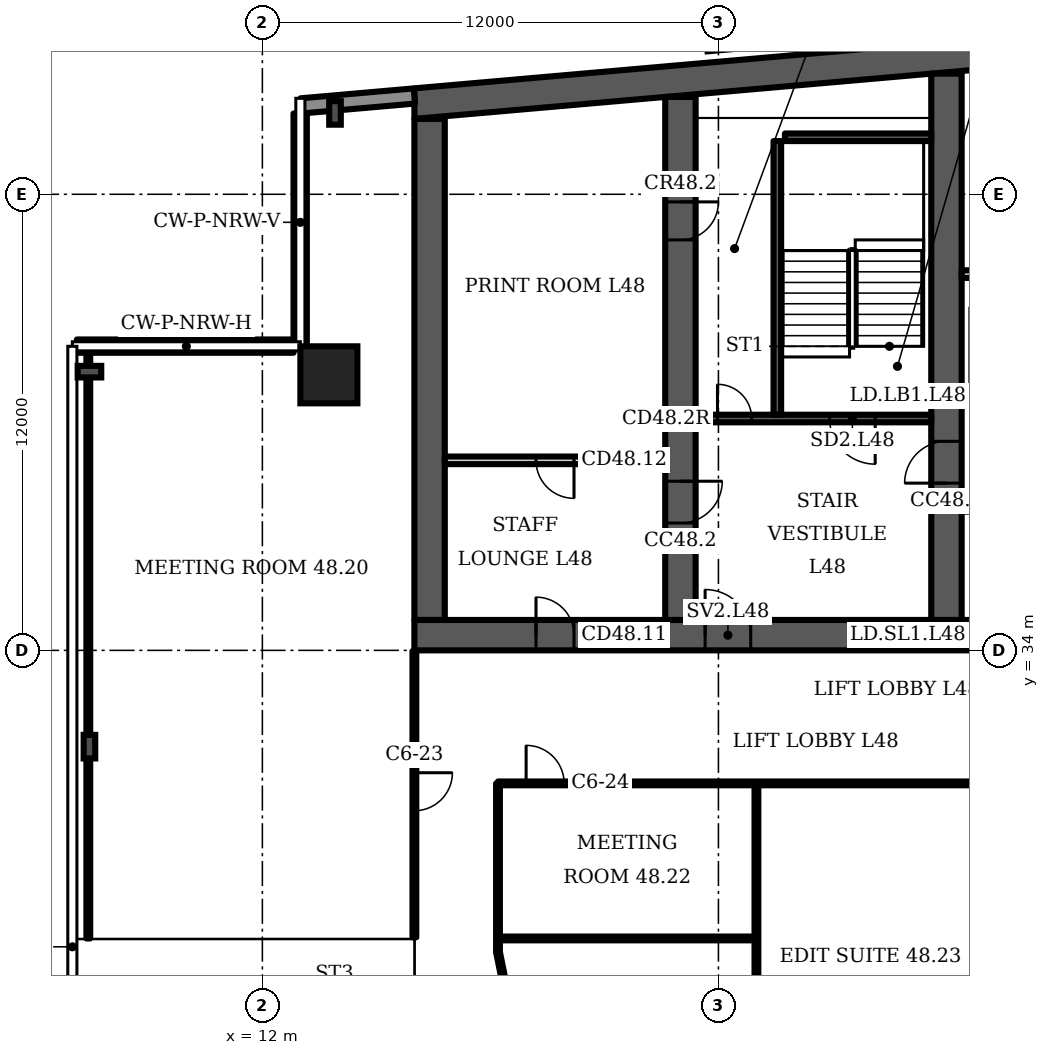
"""IFC4 building model, lengths in metres.
Left out: names, types, materials, properties, quantities, classifications, styles, units other than length and angle.
Written with IfcOpenShell. Run it as: python <this file> out.ifc"""

import sys

from ifc_helpers import new_model, si_unit, direction, frame, frame_2d, origin, origin_2d, place, context, subcontext, project, spatial, polyline, rectangle, i_section, outline, extrude, element, fill, save


model = new_model("IFC4")
c1 = context("Model", 3, precision=1e-05, world=origin(), true_north=direction((0.0, 1.0)))
c2 = subcontext(c1, "Body", "Model", "MODEL_VIEW")
j1 = project(units=[si_unit("LENGTHUNIT", "METRE"), si_unit("PLANEANGLEUNIT", "RADIAN")], contexts=[c1])
p1 = place(None, origin())
s1 = spatial("IfcSite", under=j1, at=p1, CompositionType="ELEMENT")
p2 = place(p1, origin())
s2 = spatial("IfcBuilding", under=s1, at=p2, CompositionType="ELEMENT")
p3 = place(p2, frame((0.0, 0.0, 195.1)))
s3 = spatial("IfcBuildingStorey", under=s2, at=p3, CompositionType="ELEMENT", Elevation=195.1)
p4 = place(p3, frame((0.0, 0.0, -0.0)))
e1 = element("IfcWall", 1, at=p4, inside=s3, PredefinedType="SHEAR", context=c2, shape_type="SweptSolid", body=[
    extrude(outline(polyline([(16.0, 47.984), (37.0, 49.822), (58.0, 47.984), (58.0, 48.787), (37.0, 50.625), (16.0, 48.787), (16.0, 47.984)])), origin(), (0.0, 0.0, 1.0), 3.6),
])
p5 = place(p3, frame((16.0, 34.4, 0.0), z_axis=(0.0, 0.0, 1.0), x_axis=(1.0, 0.0, 0.0)))
e2 = element("IfcWall", 2, at=p5, inside=s3, PredefinedType="SHEAR", context=c2, shape_type="SweptSolid", body=[
    extrude(rectangle(XDim=42.0, YDim=0.8, at=frame_2d((21.0, 0.0))), origin(), (0.0, 0.0, 1.0), 3.6),
])
p6 = place(p5, frame((3.2, 0.0, 0.0)))
e3 = element("IfcOpeningElement", 3, at=p6, cuts=e2, PredefinedType="OPENING", context=c2, shape_type="SweptSolid", body=[
    extrude(rectangle(XDim=1.0, YDim=2.1, at=frame_2d((0.5, 1.05))), frame((0.0, 0.41, 0.0), z_axis=(0.0, -1.0, 0.0), x_axis=(1.0, 0.0, 0.0)), (0.0, 0.0, 1.0), 0.82),
])
p7 = place(p5, frame((7.65, 0.0, 0.0)))
e4 = element("IfcOpeningElement", 4, at=p7, cuts=e2, PredefinedType="OPENING", context=c2, shape_type="SweptSolid", body=[
    extrude(rectangle(XDim=1.2, YDim=2.1, at=frame_2d((0.6, 1.05))), frame((0.0, 0.41, 0.0), z_axis=(0.0, -1.0, 0.0), x_axis=(1.0, 0.0, 0.0)), (0.0, 0.0, 1.0), 0.82),
])
p8 = place(p5, frame((14.767, 0.0, 0.0)))
e5 = element("IfcOpeningElement", 5, at=p8, cuts=e2, PredefinedType="OPENING", context=c2, shape_type="SweptSolid", body=[
    extrude(rectangle(XDim=1.1, YDim=2.1, at=frame_2d((0.55, 1.05))), frame((0.0, 0.41, 0.0), z_axis=(0.0, -1.0, 0.0), x_axis=(1.0, 0.0, 0.0)), (0.0, 0.0, 1.0), 0.82),
])
p9 = place(p5, frame((19.133, 0.0, 0.0)))
e6 = element("IfcOpeningElement", 6, at=p9, cuts=e2, PredefinedType="OPENING", context=c2, shape_type="SweptSolid", body=[
    extrude(rectangle(XDim=1.1, YDim=2.1, at=frame_2d((0.55, 1.05))), frame((0.0, 0.41, 0.0), z_axis=(0.0, -1.0, 0.0), x_axis=(1.0, 0.0, 0.0)), (0.0, 0.0, 1.0), 0.82),
])
p10 = place(p5, frame((16.8, 0.0, 0.0)))
e7 = element("IfcOpeningElement", 7, at=p10, cuts=e2, PredefinedType="OPENING", context=c2, shape_type="SweptSolid", body=[
    extrude(rectangle(XDim=1.4, YDim=2.1, at=frame_2d((0.7, 1.05))), frame((0.0, 0.41, 0.0), z_axis=(0.0, -1.0, 0.0), x_axis=(1.0, 0.0, 0.0)), (0.0, 0.0, 1.0), 0.82),
])
p11 = place(p5, frame((21.767, 0.0, 0.0)))
e8 = element("IfcOpeningElement", 8, at=p11, cuts=e2, PredefinedType="OPENING", context=c2, shape_type="SweptSolid", body=[
    extrude(rectangle(XDim=1.1, YDim=2.1, at=frame_2d((0.55, 1.05))), frame((0.0, 0.41, 0.0), z_axis=(0.0, -1.0, 0.0), x_axis=(1.0, 0.0, 0.0)), (0.0, 0.0, 1.0), 0.82),
])
p12 = place(p5, frame((23.95, 0.0, 0.0)))
e9 = element("IfcOpeningElement", 9, at=p12, cuts=e2, PredefinedType="OPENING", context=c2, shape_type="SweptSolid", body=[
    extrude(rectangle(XDim=1.1, YDim=2.1, at=frame_2d((0.55, 1.05))), frame((0.0, 0.41, 0.0), z_axis=(0.0, -1.0, 0.0), x_axis=(1.0, 0.0, 0.0)), (0.0, 0.0, 1.0), 0.82),
])
p13 = place(p5, frame((26.133, 0.0, 0.0)))
e10 = element("IfcOpeningElement", 10, at=p13, cuts=e2, PredefinedType="OPENING", context=c2, shape_type="SweptSolid", body=[
    extrude(rectangle(XDim=1.1, YDim=2.1, at=frame_2d((0.55, 1.05))), frame((0.0, 0.41, 0.0), z_axis=(0.0, -1.0, 0.0), x_axis=(1.0, 0.0, 0.0)), (0.0, 0.0, 1.0), 0.82),
])
p14 = place(p5, frame((33.15, 0.0, 0.0)))
e11 = element("IfcOpeningElement", 11, at=p14, cuts=e2, PredefinedType="OPENING", context=c2, shape_type="SweptSolid", body=[
    extrude(rectangle(XDim=1.2, YDim=2.1, at=frame_2d((0.6, 1.05))), frame((0.0, 0.41, 0.0), z_axis=(0.0, -1.0, 0.0), x_axis=(1.0, 0.0, 0.0)), (0.0, 0.0, 1.0), 0.82),
])
p15 = place(p5, frame((35.817, 0.0, 0.0)))
e12 = element("IfcOpeningElement", 12, at=p15, cuts=e2, PredefinedType="OPENING", context=c2, shape_type="SweptSolid", body=[
    extrude(rectangle(XDim=1.0, YDim=2.1, at=frame_2d((0.5, 1.05))), frame((0.0, 0.41, 0.0), z_axis=(0.0, -1.0, 0.0), x_axis=(1.0, 0.0, 0.0)), (0.0, 0.0, 1.0), 0.82),
])
p16 = place(p5, frame((39.95, 0.0, 0.0)))
e13 = element("IfcOpeningElement", 13, at=p16, cuts=e2, PredefinedType="OPENING", context=c2, shape_type="SweptSolid", body=[
    extrude(rectangle(XDim=1.0, YDim=2.1, at=frame_2d((0.5, 1.05))), frame((0.0, 0.41, 0.0), z_axis=(0.0, -1.0, 0.0), x_axis=(1.0, 0.0, 0.0)), (0.0, 0.0, 1.0), 0.82),
])
p17 = place(p5, frame((37.767, 0.0, 0.0)))
e14 = element("IfcOpeningElement", 14, at=p17, cuts=e2, PredefinedType="OPENING", context=c2, shape_type="SweptSolid", body=[
    extrude(rectangle(XDim=1.4, YDim=2.1, at=frame_2d((0.7, 1.05))), frame((0.0, 0.41, 0.0), z_axis=(0.0, -1.0, 0.0), x_axis=(1.0, 0.0, 0.0)), (0.0, 0.0, 1.0), 0.82),
])
p18 = place(p3, frame((16.4, 34.8, 0.0), z_axis=(0.0, 0.0, 1.0), x_axis=(0.0, 1.0, 0.0)))
e15 = element("IfcWall", 15, at=p18, inside=s3, PredefinedType="SHEAR", context=c2, shape_type="SweptSolid", body=[
    extrude(rectangle(XDim=13.184, YDim=0.8, at=frame_2d((6.592, 0.0))), origin(), (0.0, 0.0, 1.0), 3.6),
])
p19 = place(p3, frame((23.0, 34.8, 0.0), z_axis=(0.0, 0.0, 1.0), x_axis=(0.0, 1.0, 0.0)))
e16 = element("IfcWall", 16, at=p19, inside=s3, PredefinedType="SHEAR", context=c2, shape_type="SweptSolid", body=[
    extrude(rectangle(XDim=13.762, YDim=0.8, at=frame_2d((6.881, 0.0))), origin(), (0.0, 0.0, 1.0), 3.6),
])
p20 = place(p19, frame((2.55, 0.0, 0.0)))
e17 = element("IfcOpeningElement", 17, at=p20, cuts=e16, PredefinedType="OPENING", context=c2, shape_type="SweptSolid", body=[
    extrude(rectangle(XDim=1.1, YDim=2.1, at=frame_2d((0.55, 1.05))), frame((0.0, 0.41, 0.0), z_axis=(0.0, -1.0, 0.0), x_axis=(1.0, 0.0, 0.0)), (0.0, 0.0, 1.0), 0.82),
])
p21 = place(p19, frame((10.0, 0.0, 0.0)))
e18 = element("IfcOpeningElement", 18, at=p21, cuts=e16, PredefinedType="OPENING", context=c2, shape_type="SweptSolid", body=[
    extrude(rectangle(XDim=1.0, YDim=2.1, at=frame_2d((0.5, 1.05))), frame((0.0, 0.41, 0.0), z_axis=(0.0, -1.0, 0.0), x_axis=(1.0, 0.0, 0.0)), (0.0, 0.0, 1.0), 0.82),
])
p22 = place(p3, frame((30.0, 34.8, 0.0), z_axis=(0.0, 0.0, 1.0), x_axis=(0.0, 1.0, 0.0)))
e19 = element("IfcWall", 19, at=p22, inside=s3, PredefinedType="SHEAR", context=c2, shape_type="SweptSolid", body=[
    extrude(rectangle(XDim=14.374, YDim=0.8, at=frame_2d((7.187, 0.0))), origin(), (0.0, 0.0, 1.0), 3.6),
])
p23 = place(p22, frame((3.6, 0.0, 0.0)))
e20 = element("IfcOpeningElement", 20, at=p23, cuts=e19, PredefinedType="OPENING", context=c2, shape_type="SweptSolid", body=[
    extrude(rectangle(XDim=1.1, YDim=2.1, at=frame_2d((0.55, 1.05))), frame((0.0, 0.41, 0.0), z_axis=(0.0, -1.0, 0.0), x_axis=(1.0, 0.0, 0.0)), (0.0, 0.0, 1.0), 0.82),
])
p24 = place(p3, frame((13.75, 41.25, 0.0), z_axis=(0.0, 0.0, 1.0), x_axis=(1.0, 0.0, 0.0)))
e21 = element("IfcColumn", 21, at=p24, inside=s3, PredefinedType="COLUMN", context=c2, shape_type="SweptSolid", body=[
    extrude(rectangle(XDim=1.5, YDim=1.5, at=origin_2d()), origin(), (0.0, 0.0, 1.0), 3.6),
])
for number, where, z_axis, x_axis in (
    (22, (13.911, 48.141, 0.0), (0.0, 0.0, 1.0), (-1.0, 0.0, 0.0)),
    (23, (7.45, 41.333, 0.0), (0.0, 0.0, 1.0), (0.0, 1.0, 0.0)),
    (24, (7.45, 31.467, 0.0), (0.0, 0.0, 1.0), (-1.0, 0.0, 0.0)),
):
    element("IfcColumn", number, at=place(p3, frame(where, z_axis=z_axis, x_axis=x_axis)), inside=s3, PredefinedType="COLUMN", context=c2, shape_type="SweptSolid", body=[
        extrude(i_section(OverallWidth=0.305, OverallDepth=0.62, WebThickness=0.021, FlangeThickness=0.04, FilletRadius=0.027, at=origin_2d()), origin(), (0.0, 0.0, 1.0), 3.6),
    ])
p25 = place(p3, frame((16.0, 48.587, 0.0), z_axis=(0.0, 0.0, 1.0), x_axis=(-0.996194, -0.087168, 0.0)))
e25 = element("IfcWall", 25, at=p25, inside=s3, PredefinedType="SOLIDWALL", context=c2, shape_type="SweptSolid", body=[
    extrude(rectangle(XDim=2.994, YDim=0.4, at=frame_2d((1.497, 0.0))), origin(), (0.0, 0.0, 1.0), 3.2),
])
p26 = place(p3, frame((12.995, 48.126, 0.0), z_axis=(0.0, 0.0, 1.0), x_axis=(0.0, -1.0, 0.0)))
e26 = element("IfcWall", 26, at=p26, inside=s3, PredefinedType="SOLIDWALL", context=c2, shape_type="SweptSolid", body=[
    extrude(rectangle(XDim=6.126, YDim=0.35, at=frame_2d((3.063, 0.0))), origin(), (0.0, 0.0, 1.0), 1.0),
])
p27 = place(p3, frame((12.82, 42.005, 0.0), z_axis=(0.0, 0.0, 1.0), x_axis=(-1.0, 0.0, 0.0)))
e27 = element("IfcWall", 27, at=p27, inside=s3, PredefinedType="SOLIDWALL", context=c2, shape_type="SweptSolid", body=[
    extrude(rectangle(XDim=5.7, YDim=0.35, at=frame_2d((2.85, 0.0))), origin(), (0.0, 0.0, 1.0), 1.0),
])
p28 = place(p3, frame((16.8, 39.0, 0.0), z_axis=(0.0, 0.0, 1.0), x_axis=(1.0, 0.0, 0.0)))
e28 = element("IfcWall", 28, at=p28, inside=s3, PredefinedType="PARTITIONING", context=c2, shape_type="SweptSolid", body=[
    extrude(rectangle(XDim=5.8, YDim=0.2, at=frame_2d((2.9, 0.0))), origin(), (0.0, 0.0, 1.0), 3.2),
])
p29 = place(p28, frame((2.4, 0.0, 0.0)))
e29 = element("IfcOpeningElement", 29, at=p29, cuts=e28, PredefinedType="OPENING", context=c2, shape_type="SweptSolid", body=[
    extrude(rectangle(XDim=1.0, YDim=2.1, at=frame_2d((0.5, 1.05))), frame((0.0, 0.11, 0.0), z_axis=(0.0, -1.0, 0.0), x_axis=(1.0, 0.0, 0.0)), (0.0, 0.0, 1.0), 0.22),
])
p30 = place(p3, frame((23.4, 40.1, 0.0), z_axis=(0.0, 0.0, 1.0), x_axis=(1.0, 0.0, 0.0)))
e30 = element("IfcWall", 30, at=p30, inside=s3, PredefinedType="SHEAR", context=c2, shape_type="SweptSolid", body=[
    extrude(rectangle(XDim=6.2, YDim=0.2, at=frame_2d((3.1, 0.0))), origin(), (0.0, 0.0, 1.0), 3.2),
])
p31 = place(p30, frame((3.525, 0.0, 0.0)))
e31 = element("IfcOpeningElement", 31, at=p31, cuts=e30, PredefinedType="OPENING", context=c2, shape_type="SweptSolid", body=[
    extrude(rectangle(XDim=1.2, YDim=2.1, at=frame_2d((0.6, 1.05))), frame((0.0, 0.11, 0.0), z_axis=(0.0, -1.0, 0.0), x_axis=(1.0, 0.0, 0.0)), (0.0, 0.0, 1.0), 0.22),
])
p32 = place(p30, frame((0.575, 0.0, 0.0)))
e32 = element("IfcOpeningElement", 32, at=p32, cuts=e30, PredefinedType="OPENING", context=c2, shape_type="SweptSolid", body=[
    extrude(rectangle(XDim=0.9, YDim=2.1, at=frame_2d((0.45, 1.05))), frame((0.0, 0.11, 0.0), z_axis=(0.0, -1.0, 0.0), x_axis=(1.0, 0.0, 0.0)), (0.0, 0.0, 1.0), 0.22),
])
p33 = place(p3, frame((25.55, 40.2, 0.0), z_axis=(0.0, 0.0, 1.0), x_axis=(0.0, 1.0, 0.0)))
e33 = element("IfcWall", 33, at=p33, inside=s3, PredefinedType="SHEAR", context=c2, shape_type="SweptSolid", body=[
    extrude(rectangle(XDim=7.2, YDim=0.2, at=frame_2d((3.6, 0.0))), origin(), (0.0, 0.0, 1.0), 3.2),
])
p34 = place(p3, frame((25.75, 47.5, 0.0), z_axis=(0.0, 0.0, 1.0), x_axis=(1.0, 0.0, 0.0)))
e34 = element("IfcWall", 34, at=p34, inside=s3, PredefinedType="SHEAR", context=c2, shape_type="SweptSolid", body=[
    extrude(rectangle(XDim=3.85, YDim=0.2, at=frame_2d((1.925, 0.0))), origin(), (0.0, 0.0, 1.0), 3.2),
])
p35 = place(p3, frame((30.4, 40.7, 0.0), z_axis=(0.0, 0.0, 1.0), x_axis=(1.0, 0.0, 0.0)))
e35 = element("IfcWall", 35, at=p35, inside=s3, PredefinedType="PARTITIONING", context=c2, shape_type="SweptSolid", body=[
    extrude(rectangle(XDim=6.2, YDim=0.2, at=frame_2d((3.1, 0.0))), origin(), (0.0, 0.0, 1.0), 3.2),
])
p36 = place(p35, frame((0.367, 0.0, 0.0)))
e36 = element("IfcOpeningElement", 36, at=p36, cuts=e35, PredefinedType="OPENING", context=c2, shape_type="SweptSolid", body=[
    extrude(rectangle(XDim=1.1, YDim=2.1, at=frame_2d((0.55, 1.05))), frame((0.0, 0.11, 0.0), z_axis=(0.0, -1.0, 0.0), x_axis=(1.0, 0.0, 0.0)), (0.0, 0.0, 1.0), 0.22),
])
p37 = place(p35, frame((2.55, 0.0, 0.0)))
e37 = element("IfcOpeningElement", 37, at=p37, cuts=e35, PredefinedType="OPENING", context=c2, shape_type="SweptSolid", body=[
    extrude(rectangle(XDim=1.1, YDim=2.1, at=frame_2d((0.55, 1.05))), frame((0.0, 0.11, 0.0), z_axis=(0.0, -1.0, 0.0), x_axis=(1.0, 0.0, 0.0)), (0.0, 0.0, 1.0), 0.22),
])
p38 = place(p35, frame((4.733, 0.0, 0.0)))
e38 = element("IfcOpeningElement", 38, at=p38, cuts=e35, PredefinedType="OPENING", context=c2, shape_type="SweptSolid", body=[
    extrude(rectangle(XDim=1.1, YDim=2.1, at=frame_2d((0.55, 1.05))), frame((0.0, 0.11, 0.0), z_axis=(0.0, -1.0, 0.0), x_axis=(1.0, 0.0, 0.0)), (0.0, 0.0, 1.0), 0.22),
])
p39 = place(p3, frame((0.0, 0.0, -0.0)))
e39 = element("IfcWall", 39, at=p39, inside=s3, PredefinedType="PARTITIONING", context=c2, shape_type="SweptSolid", body=[
    extrude(outline(polyline([(32.233, 37.65), (30.4, 37.65), (30.4, 37.85), (32.233, 37.85), (32.433, 37.85), (32.433, 34.8), (32.233, 34.8), (32.233, 37.65)])), origin(), (0.0, 0.0, 1.0), 3.2),
])
p40 = place(p3, frame((0.0, 0.0, -0.0)))
e40 = element("IfcWall", 40, at=p40, inside=s3, PredefinedType="PARTITIONING", context=c2, shape_type="SweptSolid", body=[
    extrude(outline(polyline([(32.433, 40.8), (32.233, 40.8), (32.233, 43.8), (30.4, 43.8), (30.4, 44.0), (36.6, 44.0), (36.6, 43.8), (34.767, 43.8), (34.767, 40.8), (34.567, 40.8), (34.567, 43.8), (32.433, 43.8), (32.433, 40.8)])), origin(), (0.0, 0.0, 1.0), 3.2),
])
p41 = place(p3, frame((7.42, 26.42, 0.0), z_axis=(0.0, 0.0, 1.0), x_axis=(0.0, 1.0, 0.0)))
e41 = element("IfcWall", 41, at=p41, inside=s3, PredefinedType="PARTITIONING", context=c2, shape_type="SweptSolid", body=[
    extrude(rectangle(XDim=15.56, YDim=0.1, at=frame_2d((7.78, 0.0))), origin(), (0.0, 0.0, 1.0), 2.58),
])
p42 = place(p3, frame((16.0, 26.45, 0.0), z_axis=(0.0, 0.0, 1.0), x_axis=(0.0, 1.0, 0.0)))
e42 = element("IfcWall", 42, at=p42, inside=s3, PredefinedType="PARTITIONING", context=c2, shape_type="SweptSolid", body=[
    extrude(rectangle(XDim=7.53, YDim=0.1, at=frame_2d((3.765, 0.0))), origin(), (0.0, 0.0, 1.0), 3.2),
])
p43 = place(p42, frame((3.33, 0.0, 0.0)))
e43 = element("IfcOpeningElement", 43, at=p43, cuts=e42, PredefinedType="OPENING", context=c2, shape_type="SweptSolid", body=[
    extrude(rectangle(XDim=1.0, YDim=2.1, at=frame_2d((0.5, 1.05))), frame((0.0, 0.06, 0.0), z_axis=(0.0, -1.0, 0.0), x_axis=(1.0, 0.0, 0.0)), (0.0, 0.0, 1.0), 0.12),
])
p44 = place(p3, frame((18.2, 26.06, 0.0), z_axis=(0.0, 0.0, 1.0), x_axis=(0.0, 1.0, 0.0)))
e44 = element("IfcWall", 44, at=p44, inside=s3, PredefinedType="PARTITIONING", context=c2, shape_type="SweptSolid", body=[
    extrude(rectangle(XDim=4.44, YDim=0.1, at=frame_2d((2.22, 0.0))), origin(), (0.0, 0.0, 1.0), 3.2),
])
p45 = place(p3, frame((18.2, 26.42, 0.0), z_axis=(0.0, 0.0, 1.0), x_axis=(1.0, 0.0, 0.0)))
e45 = element("IfcWall", 45, at=p45, inside=s3, PredefinedType="PARTITIONING", context=c2, shape_type="SweptSolid", body=[
    extrude(rectangle(XDim=6.8, YDim=0.1, at=frame_2d((3.4, 0.0))), origin(), (0.0, 0.0, 1.0), 3.2),
])
p46 = place(p3, frame((18.2, 30.5, 0.0), z_axis=(0.0, 0.0, 1.0), x_axis=(1.0, 0.0, 0.0)))
e46 = element("IfcWall", 46, at=p46, inside=s3, PredefinedType="PARTITIONING", context=c2, shape_type="SweptSolid", body=[
    extrude(rectangle(XDim=18.65, YDim=0.1, at=frame_2d((9.325, 0.0))), origin(), (0.0, 0.0, 1.0), 3.2),
])
p47 = place(p46, frame((0.74, 0.0, 0.0)))
e47 = element("IfcOpeningElement", 47, at=p47, cuts=e46, PredefinedType="OPENING", context=c2, shape_type="SweptSolid", body=[
    extrude(rectangle(XDim=1.0, YDim=2.1, at=frame_2d((0.5, 1.05))), frame((0.0, 0.06, 0.0), z_axis=(0.0, -1.0, 0.0), x_axis=(1.0, 0.0, 0.0)), (0.0, 0.0, 1.0), 0.12),
])
p48 = place(p3, frame((18.955, 22.34, 0.0), z_axis=(0.0, 0.0, 1.0), x_axis=(-0.198935, 0.980011, 0.0)))
e48 = element("IfcWall", 48, at=p48, inside=s3, PredefinedType="PARTITIONING", context=c2, shape_type="SweptSolid", body=[
    extrude(rectangle(XDim=3.796, YDim=0.1, at=frame_2d((1.898, 0.0))), origin(), (0.0, 0.0, 1.0), 3.2),
])
p49 = place(p3, frame((25.0, 22.34, 0.0), z_axis=(0.0, 0.0, 1.0), x_axis=(0.0, 1.0, 0.0)))
e49 = element("IfcWall", 49, at=p49, inside=s3, PredefinedType="PARTITIONING", context=c2, shape_type="SweptSolid", body=[
    extrude(rectangle(XDim=8.16, YDim=0.1, at=frame_2d((4.08, 0.0))), origin(), (0.0, 0.0, 1.0), 3.2),
])
p50 = place(p6, origin())
e50 = element("IfcDoor", 50, at=p50, inside=s3, OperationType="SINGLE_SWING_LEFT", PredefinedType="DOOR", context=c2, shape_type="SweptSolid", body=[
    extrude(rectangle(XDim=1.0, YDim=2.1, at=frame_2d((0.5, 1.05))), frame((0.0, 0.4, 0.0), z_axis=(0.0, -1.0, 0.0), x_axis=(1.0, 0.0, 0.0)), (0.0, 0.0, 1.0), 0.8),
])
fill(e3, e50)
p51 = place(p29, origin())
e51 = element("IfcDoor", 51, at=p51, inside=s3, OperationType="SINGLE_SWING_RIGHT", PredefinedType="DOOR", context=c2, shape_type="SweptSolid", body=[
    extrude(rectangle(XDim=1.0, YDim=2.1, at=frame_2d((0.5, 1.05))), frame((0.0, 0.025, 0.0), z_axis=(0.0, -1.0, 0.0), x_axis=(1.0, 0.0, 0.0)), (0.0, 0.0, 1.0), 0.05),
])
fill(e29, e51)
p52 = place(p31, origin())
e52 = element("IfcDoor", 52, at=p52, inside=s3, OperationType="SINGLE_SWING_RIGHT", PredefinedType="DOOR", context=c2, shape_type="SweptSolid", body=[
    extrude(rectangle(XDim=1.2, YDim=2.1, at=frame_2d((0.6, 1.05))), frame((0.0, 0.025, 0.0), z_axis=(0.0, -1.0, 0.0), x_axis=(1.0, 0.0, 0.0)), (0.0, 0.0, 1.0), 0.05),
])
fill(e31, e52)
p53 = place(p32, origin())
e53 = element("IfcDoor", 53, at=p53, inside=s3, OperationType="SINGLE_SWING_LEFT", PredefinedType="DOOR", context=c2, shape_type="SweptSolid", body=[
    extrude(rectangle(XDim=0.9, YDim=2.1, at=frame_2d((0.45, 1.05))), frame((0.0, 0.025, 0.0), z_axis=(0.0, -1.0, 0.0), x_axis=(1.0, 0.0, 0.0)), (0.0, 0.0, 1.0), 0.05),
])
fill(e32, e53)
p54 = place(p7, origin())
e54 = element("IfcDoor", 54, at=p54, inside=s3, OperationType="SINGLE_SWING_LEFT", PredefinedType="DOOR", context=c2, shape_type="SweptSolid", body=[
    extrude(rectangle(XDim=1.2, YDim=2.1, at=frame_2d((0.6, 1.05))), frame((0.0, 0.025, 0.0), z_axis=(0.0, -1.0, 0.0), x_axis=(1.0, 0.0, 0.0)), (0.0, 0.0, 1.0), 0.05),
])
fill(e4, e54)
p55 = place(p20, origin())
e55 = element("IfcDoor", 55, at=p55, inside=s3, OperationType="SINGLE_SWING_RIGHT", PredefinedType="DOOR", context=c2, shape_type="SweptSolid", body=[
    extrude(rectangle(XDim=1.1, YDim=2.1, at=frame_2d((0.55, 1.05))), frame((0.0, 0.025, 0.0), z_axis=(0.0, -1.0, 0.0), x_axis=(1.0, 0.0, 0.0)), (0.0, 0.0, 1.0), 0.05),
])
fill(e17, e55)
p56 = place(p21, origin())
e56 = element("IfcDoor", 56, at=p56, inside=s3, OperationType="SINGLE_SWING_RIGHT", PredefinedType="DOOR", context=c2, shape_type="SweptSolid", body=[
    extrude(rectangle(XDim=1.0, YDim=2.1, at=frame_2d((0.5, 1.05))), frame((0.0, 0.4, 0.0), z_axis=(0.0, -1.0, 0.0), x_axis=(1.0, 0.0, 0.0)), (0.0, 0.0, 1.0), 0.8),
])
fill(e18, e56)
p57 = place(p23, origin())
e57 = element("IfcDoor", 57, at=p57, inside=s3, OperationType="SINGLE_SWING_LEFT", PredefinedType="DOOR", context=c2, shape_type="SweptSolid", body=[
    extrude(rectangle(XDim=1.1, YDim=2.1, at=frame_2d((0.55, 1.05))), frame((0.0, 0.025, 0.0), z_axis=(0.0, -1.0, 0.0), x_axis=(1.0, 0.0, 0.0)), (0.0, 0.0, 1.0), 0.05),
])
fill(e20, e57)
p58 = place(p43, origin())
e58 = element("IfcDoor", 58, at=p58, inside=s3, OperationType="SINGLE_SWING_RIGHT", PredefinedType="DOOR", context=c2, shape_type="SweptSolid", body=[
    extrude(rectangle(XDim=1.0, YDim=2.1, at=frame_2d((0.5, 1.05))), frame((0.0, 0.025, 0.0), z_axis=(0.0, -1.0, 0.0), x_axis=(1.0, 0.0, 0.0)), (0.0, 0.0, 1.0), 0.05),
])
fill(e43, e58)
p59 = place(p47, origin())
e59 = element("IfcDoor", 59, at=p59, inside=s3, OperationType="SINGLE_SWING_LEFT", PredefinedType="DOOR", context=c2, shape_type="SweptSolid", body=[
    extrude(rectangle(XDim=1.0, YDim=2.1, at=frame_2d((0.5, 1.05))), frame((0.0, 0.025, 0.0), z_axis=(0.0, -1.0, 0.0), x_axis=(1.0, 0.0, 0.0)), (0.0, 0.0, 1.0), 0.05),
])
fill(e47, e59)
save(model, sys.argv[1])
